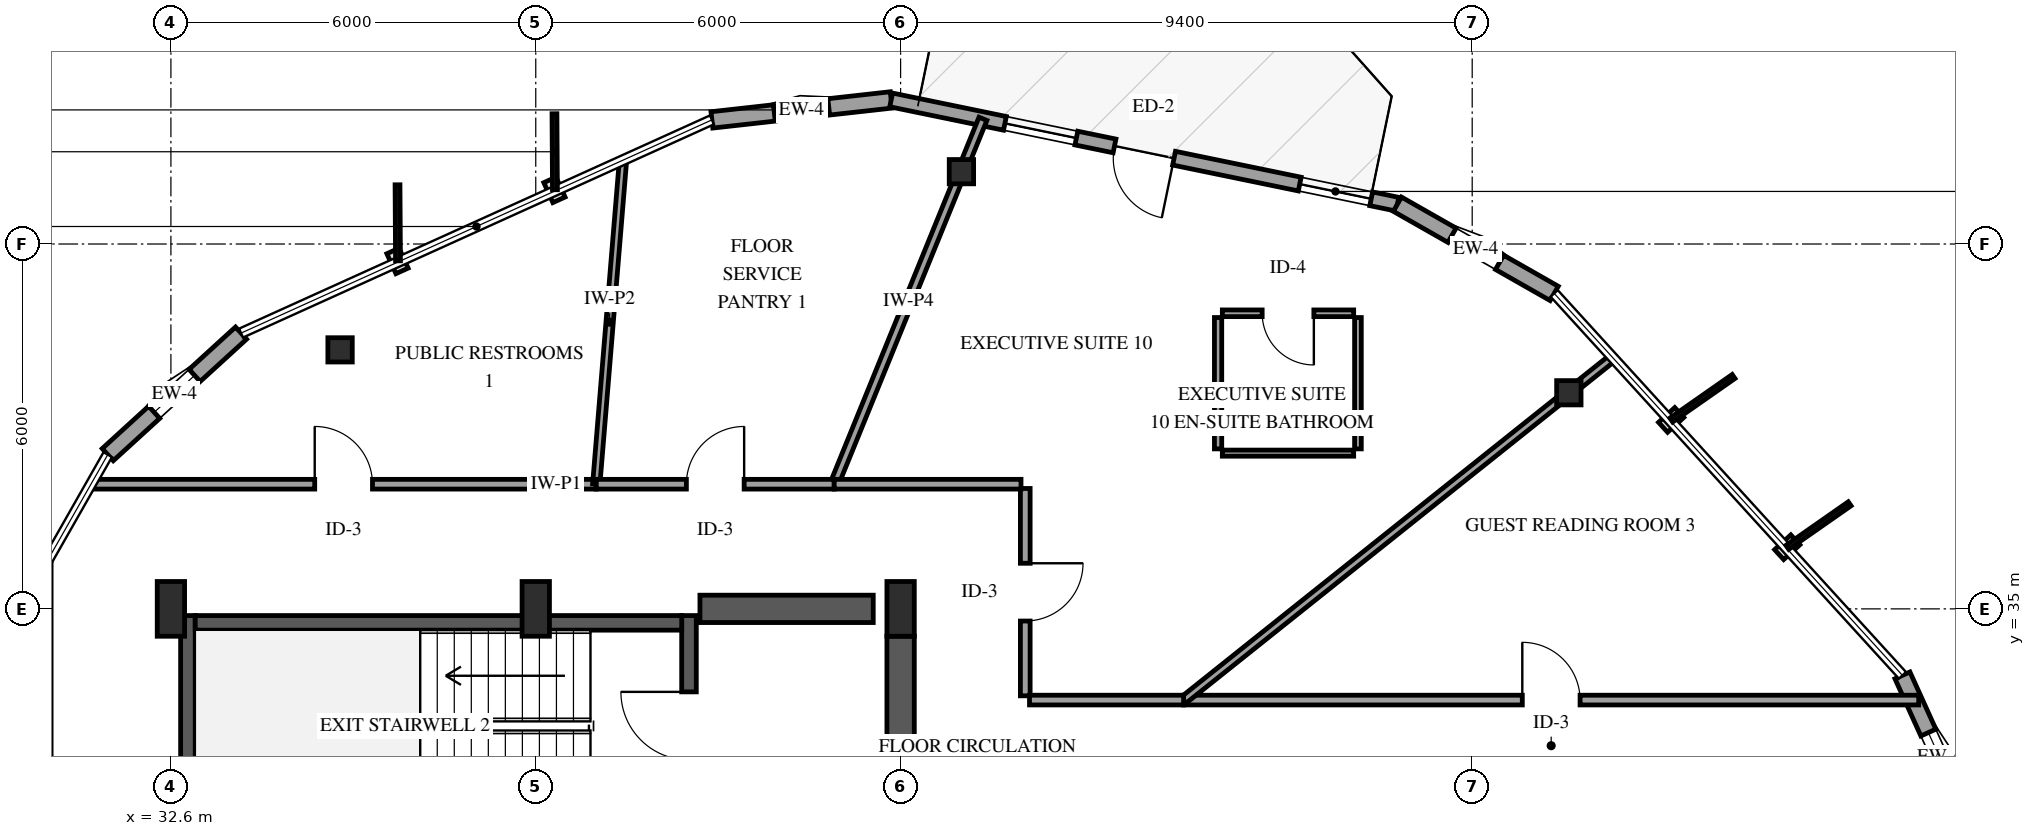
"""IFC4 building model, lengths in metres.
Left out: names, types, materials, properties, quantities, classifications, styles, units other than length and angle.
Written with IfcOpenShell. Run it as: python <this file> out.ifc"""

import sys

from ifc_helpers import new_model, si_unit, direction, frame, frame_2d, origin, origin_2d, place, context, subcontext, project, spatial, rectangle, i_section, extrude, element, fill, save


model = new_model("IFC4")
c1 = context("Model", 3, precision=1e-05, world=origin(), true_north=direction((0.0, 1.0)))
c2 = subcontext(c1, "Body", "Model", "MODEL_VIEW")
j1 = project(units=[si_unit("LENGTHUNIT", "METRE"), si_unit("PLANEANGLEUNIT", "RADIAN")], contexts=[c1])
p1 = place(None, origin())
s1 = spatial("IfcSite", under=j1, at=p1, CompositionType="ELEMENT")
p2 = place(p1, origin())
s2 = spatial("IfcBuilding", under=s1, at=p2, CompositionType="ELEMENT")
p3 = place(p2, frame((0.0, 0.0, 257.5)))
s3 = spatial("IfcBuildingStorey", under=s2, at=p3, CompositionType="ELEMENT", Elevation=257.5)
p4 = place(p3, frame((32.88, 31.26, 0.0), z_axis=(0.0, 0.0, 1.0), x_axis=(0.0, 1.0, 0.0)))
e1 = element("IfcWall", 1, at=p4, inside=s3, PredefinedType="SHEAR", context=c2, shape_type="SweptSolid", body=[
    extrude(rectangle(XDim=3.63, YDim=0.24, at=frame_2d((1.815, 0.0))), origin(), (0.0, 0.0, 1.0), 3.75),
])
p5 = place(p3, frame((41.12, 31.26, 0.0), z_axis=(0.0, 0.0, 1.0), x_axis=(0.0, 1.0, 0.0)))
e2 = element("IfcWall", 2, at=p5, inside=s3, PredefinedType="SHEAR", context=c2, shape_type="SweptSolid", body=[
    extrude(rectangle(XDim=3.63, YDim=0.24, at=frame_2d((1.815, 0.0))), origin(), (0.0, 0.0, 1.0), 3.75),
])
p6 = place(p5, frame((1.255, 0.0, 0.0)))
e3 = element("IfcOpeningElement", 3, at=p6, cuts=e2, PredefinedType="OPENING", context=c2, shape_type="SweptSolid", body=[
    extrude(rectangle(XDim=1.12, YDim=2.15, at=frame_2d((0.56, 1.075))), frame((0.0, 0.13, 0.0), z_axis=(0.0, -1.0, 0.0), x_axis=(1.0, 0.0, 0.0)), (0.0, 0.0, 1.0), 0.26),
])
p7 = place(p3, frame((33.0, 34.77, 0.0), z_axis=(0.0, 0.0, 1.0), x_axis=(1.0, 0.0, 0.0)))
e4 = element("IfcWall", 4, at=p7, inside=s3, PredefinedType="SHEAR", context=c2, shape_type="SweptSolid", body=[
    extrude(rectangle(XDim=8.0, YDim=0.24, at=frame_2d((4.0, 0.0))), origin(), (0.0, 0.0, 1.0), 3.75),
])
p8 = place(p3, frame((41.3, 35.0, 0.0), z_axis=(0.0, 0.0, 1.0), x_axis=(1.0, 0.0, 0.0)))
e5 = element("IfcWall", 5, at=p8, inside=s3, PredefinedType="SHEAR", context=c2, shape_type="SweptSolid", body=[
    extrude(rectangle(XDim=2.85, YDim=0.45, at=frame_2d((1.425, 0.0))), origin(), (0.0, 0.0, 1.0), 3.75),
])
p9 = place(p3, frame((44.6, 29.8, 0.0), z_axis=(0.0, 0.0, 1.0), x_axis=(0.0, 1.0, 0.0)))
e6 = element("IfcWall", 6, at=p9, inside=s3, PredefinedType="SHEAR", context=c2, shape_type="SweptSolid", body=[
    extrude(rectangle(XDim=4.75, YDim=0.45, at=frame_2d((2.375, 0.0))), origin(), (0.0, 0.0, 1.0), 3.75),
])
for number, where, z_axis, x_axis in (
    (7, (32.6, 35.0, 0.0), (0.0, 0.0, 1.0), (1.0, 0.0, 0.0)),
    (8, (38.6, 35.0, 0.0), (0.0, 0.0, 1.0), (1.0, 0.0, 0.0)),
    (9, (44.6, 35.0, 0.0), (0.0, 0.0, 1.0), (1.0, 0.0, 0.0)),
):
    element("IfcColumn", number, at=place(p3, frame(where, z_axis=z_axis, x_axis=x_axis)), inside=s3, PredefinedType="PILASTER", context=c2, shape_type="SweptSolid", body=[
        extrude(rectangle(XDim=0.45, YDim=0.9, at=origin_2d()), origin(), (0.0, 0.0, 1.0), 3.75),
    ])
for number, where, z_axis, x_axis in (
    (10, (55.589, 38.554, 0.0), (0.0, 0.0, 1.0), (1.0, 0.0, 0.0)),
    (11, (45.6, 42.189, 0.0), (0.0, 0.0, 1.0), (1.0, 0.0, 0.0)),
    (12, (35.382, 39.26, 0.0), (0.0, 0.0, 1.0), (1.0, 0.0, 0.0)),
):
    element("IfcColumn", number, at=place(p3, frame(where, z_axis=z_axis, x_axis=x_axis)), inside=s3, PredefinedType="COLUMN", context=c2, shape_type="SweptSolid", body=[
        extrude(i_section(OverallWidth=0.401, OverallDepth=0.399, WebThickness=0.025, FlangeThickness=0.04, FilletRadius=0.038, at=origin_2d()), origin(), (0.0, 0.0, 1.0), 3.75),
    ])
p10 = place(p3, frame((44.445, 43.37, 0.0), z_axis=(0.0, 0.0, 1.0), x_axis=(-0.993846546507, -0.110765707676, 0.0)))
e13 = element("IfcWall", 13, at=p10, inside=s3, PredefinedType="SOLIDWALL", context=c2, shape_type="SweptSolid", body=[
    extrude(rectangle(XDim=2.967, YDim=0.27, at=frame_2d((1.483, 0.0))), origin(), (0.0, 0.0, 1.0), 2.829),
])
p11 = place(p10, frame((1.033, 0.0, 0.75)))
e14 = element("IfcOpeningElement", 14, at=p11, cuts=e13, PredefinedType="OPENING", context=c2, shape_type="SweptSolid", body=[
    extrude(rectangle(XDim=0.9, YDim=1.5, at=frame_2d((0.45, 0.75))), frame((0.0, 0.145, 0.0), z_axis=(0.0, -1.0, 0.0), x_axis=(1.0, 0.0, 0.0)), (0.0, 0.0, 1.0), 0.29),
])
p12 = place(p3, frame((52.77, 41.655, 0.0), z_axis=(0.0, 0.0, 1.0), x_axis=(-0.979436514716, 0.201752605043, 0.0)))
e15 = element("IfcWall", 15, at=p12, inside=s3, PredefinedType="SOLIDWALL", context=c2, shape_type="SweptSolid", body=[
    extrude(rectangle(XDim=8.5, YDim=0.23, at=frame_2d((4.25, 0.0))), origin(), (0.0, 0.0, 1.0), 2.829),
])
p13 = place(p12, frame((3.75, 0.0, 0.0)))
e16 = element("IfcOpeningElement", 16, at=p13, cuts=e15, PredefinedType="OPENING", context=c2, shape_type="SweptSolid", body=[
    extrude(rectangle(XDim=1.0, YDim=2.15, at=frame_2d((0.5, 1.075))), frame((0.0, 0.125, 0.0), z_axis=(0.0, -1.0, 0.0), x_axis=(1.0, 0.0, 0.0)), (0.0, 0.0, 1.0), 0.25),
])
p14 = place(p12, frame((0.44, 0.0, 0.72)))
e17 = element("IfcOpeningElement", 17, at=p14, cuts=e15, PredefinedType="OPENING", context=c2, shape_type="SweptSolid", body=[
    extrude(rectangle(XDim=1.2, YDim=1.6, at=frame_2d((0.6, 0.8))), frame((0.0, 0.125, 0.0), z_axis=(0.0, -1.0, 0.0), x_axis=(1.0, 0.0, 0.0)), (0.0, 0.0, 1.0), 0.25),
])
p15 = place(p12, frame((5.39, 0.0, 0.72)))
e18 = element("IfcOpeningElement", 18, at=p15, cuts=e15, PredefinedType="OPENING", context=c2, shape_type="SweptSolid", body=[
    extrude(rectangle(XDim=1.2, YDim=1.6, at=frame_2d((0.6, 0.8))), frame((0.0, 0.125, 0.0), z_axis=(0.0, -1.0, 0.0), x_axis=(1.0, 0.0, 0.0)), (0.0, 0.0, 1.0), 0.25),
])
p16 = place(p3, frame((33.754, 39.535, 0.0), z_axis=(0.0, 0.0, 1.0), x_axis=(-0.73894499787, -0.673765753153, 0.0)))
e19 = element("IfcWall", 19, at=p16, inside=s3, PredefinedType="SOLIDWALL", context=c2, shape_type="SweptSolid", body=[
    extrude(rectangle(XDim=2.967, YDim=0.27, at=frame_2d((1.483, 0.0))), origin(), (0.0, 0.0, 1.0), 2.829),
])
p17 = place(p16, frame((1.033, 0.0, 0.75)))
e20 = element("IfcOpeningElement", 20, at=p17, cuts=e19, PredefinedType="OPENING", context=c2, shape_type="SweptSolid", body=[
    extrude(rectangle(XDim=0.9, YDim=1.5, at=frame_2d((0.45, 0.75))), frame((0.0, 0.145, 0.0), z_axis=(0.0, -1.0, 0.0), x_axis=(1.0, 0.0, 0.0)), (0.0, 0.0, 1.0), 0.29),
])
p18 = place(p3, frame((62.299, 31.204, 0.0), z_axis=(0.0, 0.0, 1.0), x_axis=(-0.412481781571, 0.910965850003, 0.0)))
e21 = element("IfcWall", 21, at=p18, inside=s3, PredefinedType="SOLIDWALL", context=c2, shape_type="SweptSolid", body=[
    extrude(rectangle(XDim=2.967, YDim=0.27, at=frame_2d((1.483, 0.0))), origin(), (0.0, 0.0, 1.0), 2.829),
])
p19 = place(p18, frame((1.033, 0.0, 0.75)))
e22 = element("IfcOpeningElement", 22, at=p19, cuts=e21, PredefinedType="OPENING", context=c2, shape_type="SweptSolid", body=[
    extrude(rectangle(XDim=0.9, YDim=1.5, at=frame_2d((0.45, 0.75))), frame((0.0, 0.145, 0.0), z_axis=(0.0, -1.0, 0.0), x_axis=(1.0, 0.0, 0.0)), (0.0, 0.0, 1.0), 0.29),
])
p20 = place(p3, frame((55.348, 40.188, 0.0), z_axis=(0.0, 0.0, 1.0), x_axis=(-0.869122967752, 0.494596064406, 0.0)))
e23 = element("IfcWall", 23, at=p20, inside=s3, PredefinedType="SOLIDWALL", context=c2, shape_type="SweptSolid", body=[
    extrude(rectangle(XDim=2.967, YDim=0.27, at=frame_2d((1.483, 0.0))), origin(), (0.0, 0.0, 1.0), 2.829),
])
p21 = place(p20, frame((1.033, 0.0, 0.75)))
e24 = element("IfcOpeningElement", 24, at=p21, cuts=e23, PredefinedType="OPENING", context=c2, shape_type="SweptSolid", body=[
    extrude(rectangle(XDim=0.9, YDim=1.5, at=frame_2d((0.45, 0.75))), frame((0.0, 0.145, 0.0), z_axis=(0.0, -1.0, 0.0), x_axis=(1.0, 0.0, 0.0)), (0.0, 0.0, 1.0), 0.29),
])
p22 = place(p3, frame((49.254, 33.5, 0.0), z_axis=(0.0, 0.0, 1.0), x_axis=(1.0, 0.0, 0.0)))
e25 = element("IfcWall", 25, at=p22, inside=s3, PredefinedType="PARTITIONING", context=c2, shape_type="SweptSolid", body=[
    extrude(rectangle(XDim=12.089, YDim=0.16, at=frame_2d((6.044, 0.0))), origin(), (0.0, 0.0, 1.0), 3.45),
])
p23 = place(p22, frame((5.57, 0.0, 0.0)))
e26 = element("IfcOpeningElement", 26, at=p23, cuts=e25, PredefinedType="OPENING", context=c2, shape_type="SweptSolid", body=[
    extrude(rectangle(XDim=0.95, YDim=2.15, at=frame_2d((0.475, 1.075))), frame((0.0, 0.09, 0.0), z_axis=(0.0, -1.0, 0.0), x_axis=(1.0, 0.0, 0.0)), (0.0, 0.0, 1.0), 0.18),
])
p24 = place(p3, frame((49.254, 33.5, 0.0), z_axis=(0.0, 0.0, 1.0), x_axis=(0.781699074936, 0.623655799495, 0.0)))
e27 = element("IfcWall", 27, at=p24, inside=s3, PredefinedType="PARTITIONING", context=c2, shape_type="SweptSolid", body=[
    extrude(rectangle(XDim=9.029, YDim=0.13, at=frame_2d((4.515, 0.0))), origin(), (0.0, 0.0, 1.0), 3.45),
])
p25 = place(p3, frame((31.285, 37.05, 0.0), z_axis=(0.0, 0.0, 1.0), x_axis=(1.0, 0.0, 0.0)))
e28 = element("IfcWall", 28, at=p25, inside=s3, PredefinedType="PARTITIONING", context=c2, shape_type="SweptSolid", body=[
    extrude(rectangle(XDim=8.31, YDim=0.16, at=frame_2d((4.155, 0.0))), origin(), (0.0, 0.0, 1.0), 3.45),
])
p26 = place(p25, frame((3.68, 0.0, 0.0)))
e29 = element("IfcOpeningElement", 29, at=p26, cuts=e28, PredefinedType="OPENING", context=c2, shape_type="SweptSolid", body=[
    extrude(rectangle(XDim=0.95, YDim=2.15, at=frame_2d((0.475, 1.075))), frame((0.0, 0.09, 0.0), z_axis=(0.0, -1.0, 0.0), x_axis=(1.0, 0.0, 0.0)), (0.0, 0.0, 1.0), 0.18),
])
p27 = place(p3, frame((43.508, 37.05, 0.0), z_axis=(0.0, 0.0, 1.0), x_axis=(0.377021945249, 0.926204325622, 0.0)))
e30 = element("IfcWall", 30, at=p27, inside=s3, PredefinedType="PARTITIONING", context=c2, shape_type="SweptSolid", body=[
    extrude(rectangle(XDim=6.488, YDim=0.14, at=frame_2d((3.244, 0.0))), origin(), (0.0, 0.0, 1.0), 2.745),
])
p28 = place(p3, frame((39.595, 37.05, 0.0), z_axis=(0.0, 0.0, 1.0), x_axis=(0.082278376052, 0.996609386286, 0.0)))
e31 = element("IfcWall", 31, at=p28, inside=s3, PredefinedType="PARTITIONING", context=c2, shape_type="SweptSolid", body=[
    extrude(rectangle(XDim=5.347, YDim=0.12, at=frame_2d((2.673, 0.0))), origin(), (0.0, 0.0, 1.0), 3.45),
])
p29 = place(p3, frame((39.595, 37.05, 0.0), z_axis=(0.0, 0.0, 1.0), x_axis=(1.0, 0.0, 0.0)))
e32 = element("IfcWall", 32, at=p29, inside=s3, PredefinedType="PARTITIONING", context=c2, shape_type="SweptSolid", body=[
    extrude(rectangle(XDim=3.913, YDim=0.16, at=frame_2d((1.957, 0.0))), origin(), (0.0, 0.0, 1.0), 3.45),
])
p30 = place(p29, frame((1.482, 0.0, 0.0)))
e33 = element("IfcOpeningElement", 33, at=p30, cuts=e32, PredefinedType="OPENING", context=c2, shape_type="SweptSolid", body=[
    extrude(rectangle(XDim=0.95, YDim=2.15, at=frame_2d((0.475, 1.075))), frame((0.0, 0.09, 0.0), z_axis=(0.0, -1.0, 0.0), x_axis=(1.0, 0.0, 0.0)), (0.0, 0.0, 1.0), 0.18),
])
p31 = place(p3, frame((46.65, 36.98, 0.0), z_axis=(0.0, 0.0, 1.0), x_axis=(0.0, -1.0, 0.0)))
e34 = element("IfcWall", 34, at=p31, inside=s3, PredefinedType="PARTITIONING", context=c2, shape_type="SweptSolid", body=[
    extrude(rectangle(XDim=3.41, YDim=0.16, at=frame_2d((1.705, 0.0))), origin(), (0.0, 0.0, 1.0), 3.45),
])
p32 = place(p31, frame((1.23, 0.0, 0.0)))
e35 = element("IfcOpeningElement", 35, at=p32, cuts=e34, PredefinedType="OPENING", context=c2, shape_type="SweptSolid", body=[
    extrude(rectangle(XDim=0.95, YDim=2.15, at=frame_2d((0.475, 1.075))), frame((0.0, 0.09, 0.0), z_axis=(0.0, -1.0, 0.0), x_axis=(1.0, 0.0, 0.0)), (0.0, 0.0, 1.0), 0.18),
])
p33 = place(p3, frame((43.508, 37.05, 0.0), z_axis=(0.0, 0.0, 1.0), x_axis=(1.0, 0.0, 0.0)))
e36 = element("IfcWall", 36, at=p33, inside=s3, PredefinedType="PARTITIONING", context=c2, shape_type="SweptSolid", body=[
    extrude(rectangle(XDim=3.072, YDim=0.16, at=frame_2d((1.536, 0.0))), origin(), (0.0, 0.0, 1.0), 3.45),
])
p34 = place(p3, frame((46.72, 33.5, 0.0), z_axis=(0.0, 0.0, 1.0), x_axis=(1.0, 0.0, 0.0)))
e37 = element("IfcWall", 37, at=p34, inside=s3, PredefinedType="PARTITIONING", context=c2, shape_type="SweptSolid", body=[
    extrude(rectangle(XDim=2.534, YDim=0.16, at=frame_2d((1.267, 0.0))), origin(), (0.0, 0.0, 1.0), 3.45),
])
p35 = place(p3, frame((52.051, 39.861, 0.0), z_axis=(0.0, 0.0, 1.0), x_axis=(-1.0, 0.0, 0.0)))
e38 = element("IfcWall", 38, at=p35, inside=s3, PredefinedType="PARTITIONING", context=c2, shape_type="SweptSolid", body=[
    extrude(rectangle(XDim=2.16, YDim=0.11, at=frame_2d((1.08, 0.0))), origin(), (0.0, 0.0, 1.0), 3.45),
])
p36 = place(p35, frame((0.655, 0.0, 0.0)))
e39 = element("IfcOpeningElement", 39, at=p36, cuts=e38, PredefinedType="OPENING", context=c2, shape_type="SweptSolid", body=[
    extrude(rectangle(XDim=0.85, YDim=2.1, at=frame_2d((0.425, 1.05))), frame((0.0, 0.065, 0.0), z_axis=(0.0, -1.0, 0.0), x_axis=(1.0, 0.0, 0.0)), (0.0, 0.0, 1.0), 0.13),
])
p37 = place(p3, frame((49.891, 37.561, 0.0), z_axis=(0.0, 0.0, 1.0), x_axis=(1.0, 0.0, 0.0)))
e40 = element("IfcWall", 40, at=p37, inside=s3, PredefinedType="PARTITIONING", context=c2, shape_type="SweptSolid", body=[
    extrude(rectangle(XDim=2.16, YDim=0.1, at=frame_2d((1.08, 0.0))), origin(), (0.0, 0.0, 1.0), 3.45),
])
p38 = place(p3, frame((49.821, 39.791, 0.0), z_axis=(0.0, 0.0, 1.0), x_axis=(0.0, -1.0, 0.0)))
e41 = element("IfcWall", 41, at=p38, inside=s3, PredefinedType="PARTITIONING", context=c2, shape_type="SweptSolid", body=[
    extrude(rectangle(XDim=2.16, YDim=0.12, at=frame_2d((1.08, 0.0))), origin(), (0.0, 0.0, 1.0), 3.45),
])
p39 = place(p3, frame((52.121, 37.631, 0.0), z_axis=(0.0, 0.0, 1.0), x_axis=(0.0, 1.0, 0.0)))
e42 = element("IfcWall", 42, at=p39, inside=s3, PredefinedType="PARTITIONING", context=c2, shape_type="SweptSolid", body=[
    extrude(rectangle(XDim=2.16, YDim=0.11, at=frame_2d((1.08, 0.0))), origin(), (0.0, 0.0, 1.0), 3.45),
])
p40 = place(p11, origin())
e43 = element("IfcWindow", 43, at=p40, inside=s3, PartitioningType="SINGLE_PANEL", PredefinedType="WINDOW", context=c2, shape_type="SweptSolid", body=[
    extrude(rectangle(XDim=0.9, YDim=1.5, at=frame_2d((0.45, 0.75))), frame((0.0, 0.03, 0.0), z_axis=(0.0, -1.0, 0.0), x_axis=(1.0, 0.0, 0.0)), (0.0, 0.0, 1.0), 0.06),
])
fill(e14, e43)
p41 = place(p13, origin())
e44 = element("IfcDoor", 44, at=p41, inside=s3, OperationType="SINGLE_SWING_LEFT", PredefinedType="DOOR", context=c2, shape_type="SweptSolid", body=[
    extrude(rectangle(XDim=1.0, YDim=2.15, at=frame_2d((0.5, 1.075))), frame((0.0, 0.025, 0.0), z_axis=(0.0, -1.0, 0.0), x_axis=(1.0, 0.0, 0.0)), (0.0, 0.0, 1.0), 0.05),
])
fill(e16, e44)
p42 = place(p14, origin())
e45 = element("IfcWindow", 45, at=p42, inside=s3, PartitioningType="SINGLE_PANEL", PredefinedType="WINDOW", context=c2, shape_type="SweptSolid", body=[
    extrude(rectangle(XDim=1.2, YDim=1.6, at=frame_2d((0.6, 0.8))), frame((0.0, 0.03, 0.0), z_axis=(0.0, -1.0, 0.0), x_axis=(1.0, 0.0, 0.0)), (0.0, 0.0, 1.0), 0.06),
])
fill(e17, e45)
p43 = place(p15, origin())
e46 = element("IfcWindow", 46, at=p43, inside=s3, PartitioningType="SINGLE_PANEL", PredefinedType="WINDOW", context=c2, shape_type="SweptSolid", body=[
    extrude(rectangle(XDim=1.2, YDim=1.6, at=frame_2d((0.6, 0.8))), frame((0.0, 0.03, 0.0), z_axis=(0.0, -1.0, 0.0), x_axis=(1.0, 0.0, 0.0)), (0.0, 0.0, 1.0), 0.06),
])
fill(e18, e46)
p44 = place(p17, origin())
e47 = element("IfcWindow", 47, at=p44, inside=s3, PartitioningType="SINGLE_PANEL", PredefinedType="WINDOW", context=c2, shape_type="SweptSolid", body=[
    extrude(rectangle(XDim=0.9, YDim=1.5, at=frame_2d((0.45, 0.75))), frame((0.0, 0.03, 0.0), z_axis=(0.0, -1.0, 0.0), x_axis=(1.0, 0.0, 0.0)), (0.0, 0.0, 1.0), 0.06),
])
fill(e20, e47)
p45 = place(p19, origin())
e48 = element("IfcWindow", 48, at=p45, inside=s3, PartitioningType="SINGLE_PANEL", PredefinedType="WINDOW", context=c2, shape_type="SweptSolid", body=[
    extrude(rectangle(XDim=0.9, YDim=1.5, at=frame_2d((0.45, 0.75))), frame((0.0, 0.03, 0.0), z_axis=(0.0, -1.0, 0.0), x_axis=(1.0, 0.0, 0.0)), (0.0, 0.0, 1.0), 0.06),
])
fill(e22, e48)
p46 = place(p21, origin())
e49 = element("IfcWindow", 49, at=p46, inside=s3, PartitioningType="SINGLE_PANEL", PredefinedType="WINDOW", context=c2, shape_type="SweptSolid", body=[
    extrude(rectangle(XDim=0.9, YDim=1.5, at=frame_2d((0.45, 0.75))), frame((0.0, 0.03, 0.0), z_axis=(0.0, -1.0, 0.0), x_axis=(1.0, 0.0, 0.0)), (0.0, 0.0, 1.0), 0.06),
])
fill(e24, e49)
p47 = place(p6, origin())
e50 = element("IfcDoor", 50, at=p47, inside=s3, OperationType="SINGLE_SWING_RIGHT", PredefinedType="DOOR", context=c2, shape_type="SweptSolid", body=[
    extrude(rectangle(XDim=1.12, YDim=2.15, at=frame_2d((0.56, 1.075))), frame((0.0, 0.025, 0.0), z_axis=(0.0, -1.0, 0.0), x_axis=(1.0, 0.0, 0.0)), (0.0, 0.0, 1.0), 0.05),
])
fill(e3, e50)
p48 = place(p23, origin())
e51 = element("IfcDoor", 51, at=p48, inside=s3, OperationType="SINGLE_SWING_LEFT", PredefinedType="DOOR", context=c2, shape_type="SweptSolid", body=[
    extrude(rectangle(XDim=0.95, YDim=2.15, at=frame_2d((0.475, 1.075))), frame((0.0, 0.025, 0.0), z_axis=(0.0, -1.0, 0.0), x_axis=(1.0, 0.0, 0.0)), (0.0, 0.0, 1.0), 0.05),
])
fill(e26, e51)
p49 = place(p26, origin())
e52 = element("IfcDoor", 52, at=p49, inside=s3, OperationType="SINGLE_SWING_LEFT", PredefinedType="DOOR", context=c2, shape_type="SweptSolid", body=[
    extrude(rectangle(XDim=0.95, YDim=2.15, at=frame_2d((0.475, 1.075))), frame((0.0, 0.025, 0.0), z_axis=(0.0, -1.0, 0.0), x_axis=(1.0, 0.0, 0.0)), (0.0, 0.0, 1.0), 0.05),
])
fill(e29, e52)
p50 = place(p30, origin())
e53 = element("IfcDoor", 53, at=p50, inside=s3, OperationType="SINGLE_SWING_RIGHT", PredefinedType="DOOR", context=c2, shape_type="SweptSolid", body=[
    extrude(rectangle(XDim=0.95, YDim=2.15, at=frame_2d((0.475, 1.075))), frame((0.0, 0.025, 0.0), z_axis=(0.0, -1.0, 0.0), x_axis=(1.0, 0.0, 0.0)), (0.0, 0.0, 1.0), 0.05),
])
fill(e33, e53)
p51 = place(p32, origin())
e54 = element("IfcDoor", 54, at=p51, inside=s3, OperationType="SINGLE_SWING_LEFT", PredefinedType="DOOR", context=c2, shape_type="SweptSolid", body=[
    extrude(rectangle(XDim=0.95, YDim=2.15, at=frame_2d((0.475, 1.075))), frame((0.0, 0.025, 0.0), z_axis=(0.0, -1.0, 0.0), x_axis=(1.0, 0.0, 0.0)), (0.0, 0.0, 1.0), 0.05),
])
fill(e35, e54)
p52 = place(p36, origin())
e55 = element("IfcDoor", 55, at=p52, inside=s3, OperationType="SINGLE_SWING_LEFT", PredefinedType="DOOR", context=c2, shape_type="SweptSolid", body=[
    extrude(rectangle(XDim=0.85, YDim=2.1, at=frame_2d((0.425, 1.05))), frame((0.0, 0.025, 0.0), z_axis=(0.0, -1.0, 0.0), x_axis=(1.0, 0.0, 0.0)), (0.0, 0.0, 1.0), 0.05),
])
fill(e39, e55)
save(model, sys.argv[1])
